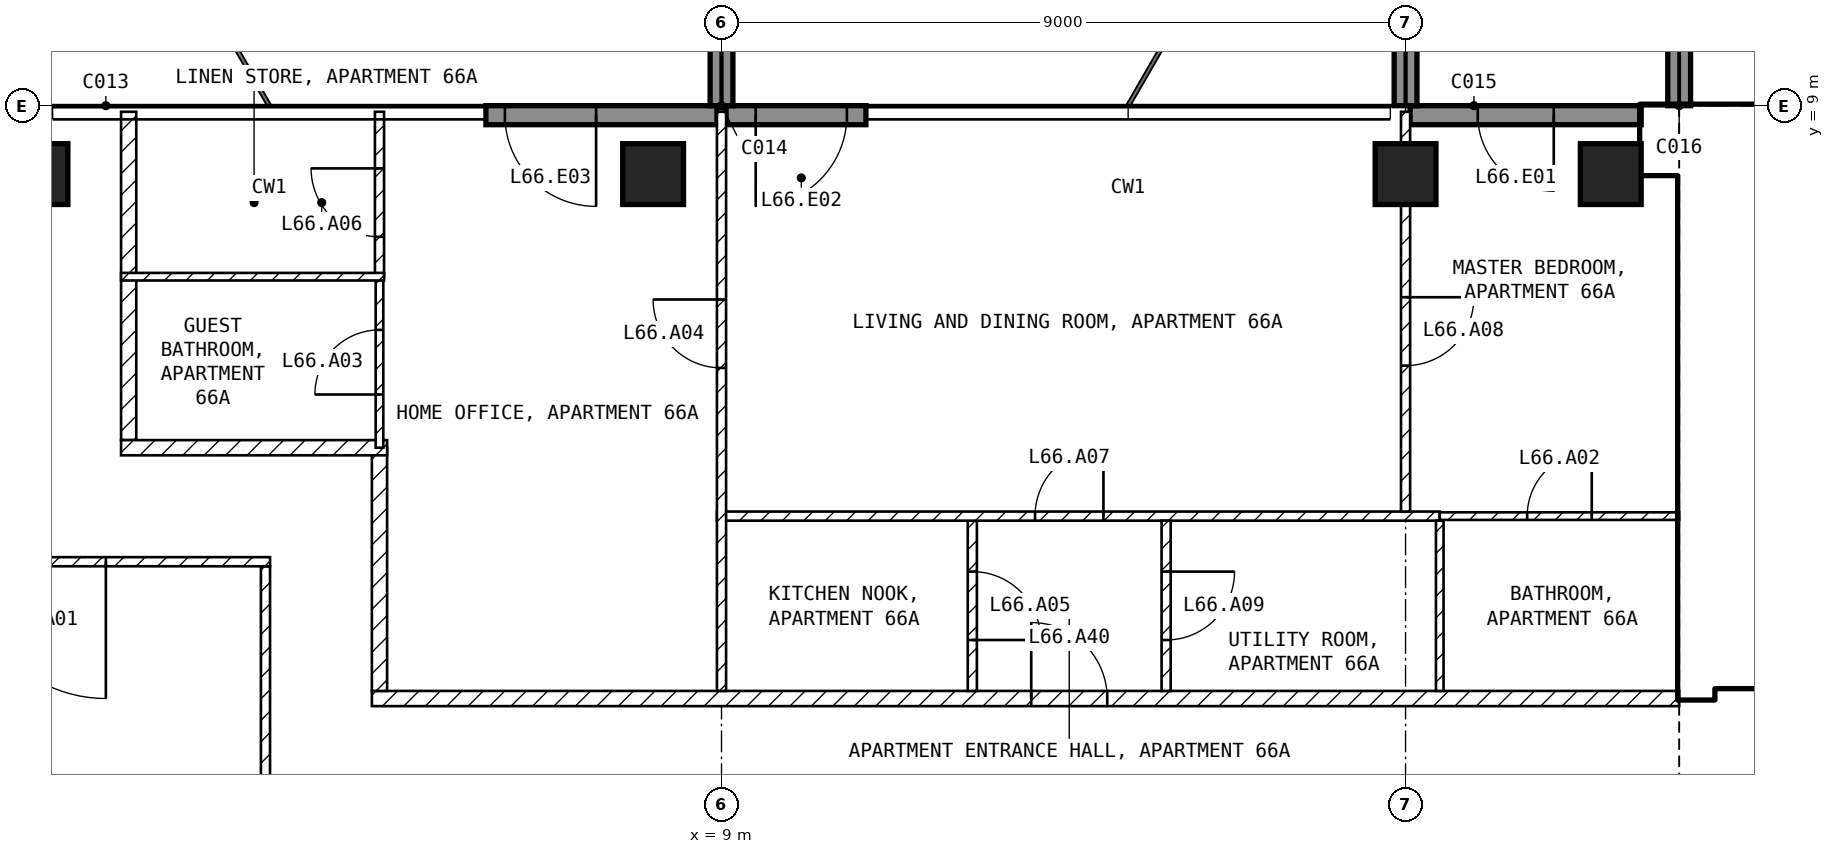
"""IFC4 building model, lengths in metres.
Left out: names, types, materials, properties, quantities, classifications, styles, units other than length and angle.
Written with IfcOpenShell. Run it as: python <this file> out.ifc"""

import sys

from ifc_helpers import new_model, si_unit, direction, frame, frame_2d, origin, origin_2d, place, context, subcontext, project, spatial, rectangle, extrude, element, fill, save


model = new_model("IFC4")
c1 = context("Model", 3, precision=1e-05, world=origin(), true_north=direction((0.0, 1.0)))
c2 = subcontext(c1, "Body", "Model", "MODEL_VIEW")
j1 = project(units=[si_unit("LENGTHUNIT", "METRE"), si_unit("PLANEANGLEUNIT", "RADIAN")], contexts=[c1])
p1 = place(None, origin())
s1 = spatial("IfcSite", under=j1, at=p1, CompositionType="ELEMENT")
p2 = place(p1, origin())
s2 = spatial("IfcBuilding", under=s1, at=p2, CompositionType="ELEMENT")
p3 = place(p2, frame((0.0, 0.0, 260.5)))
s3 = spatial("IfcBuildingStorey", under=s2, at=p3, CompositionType="ELEMENT", Elevation=260.5)
for number, where, z_axis, x_axis in (
    (1, (0.0, 8.1, -0.25), (0.0, 0.0, 1.0), (1.0, 0.0, 0.0)),
    (2, (8.1, 8.1, -0.25), (0.0, 0.0, 1.0), (1.0, 0.0, 0.0)),
    (3, (18.0, 8.1, -0.25), (0.0, 0.0, 1.0), (1.0, 0.0, 0.0)),
    (4, (20.7, 8.1, -0.25), (0.0, 0.0, 1.0), (1.0, 0.0, 0.0)),
):
    element("IfcColumn", number, at=place(p3, frame(where, z_axis=z_axis, x_axis=x_axis)), inside=s3, PredefinedType="COLUMN", context=c2, shape_type="SweptSolid", body=[
        extrude(rectangle(XDim=0.8, YDim=0.8, at=origin_2d()), origin(), (0.0, 0.0, 1.0), 3.5),
    ])
p4 = place(p3, frame((21.1, 8.875, 0.0), z_axis=(0.0, 0.0, 1.0), x_axis=(-1.0, 0.0, 0.0)))
e5 = element("IfcWall", 5, at=p4, inside=s3, PredefinedType="SOLIDWALL", context=c2, shape_type="SweptSolid", body=[
    extrude(rectangle(XDim=3.04, YDim=0.25, at=frame_2d((1.52, 0.0))), origin(), (0.0, 0.0, 1.0), 3.25),
])
p5 = place(p4, frame((1.15, 0.0, 0.0)))
e6 = element("IfcOpeningElement", 6, at=p5, cuts=e5, PredefinedType="OPENING", context=c2, shape_type="SweptSolid", body=[
    extrude(rectangle(XDim=1.0, YDim=2.4, at=frame_2d((0.5, 1.2))), frame((0.0, 0.135, 0.0), z_axis=(0.0, -1.0, 0.0), x_axis=(1.0, 0.0, 0.0)), (0.0, 0.0, 1.0), 0.27),
])
p6 = place(p3, frame((10.9, 8.875, 0.0), z_axis=(0.0, 0.0, 1.0), x_axis=(-1.0, 0.0, 0.0)))
e7 = element("IfcWall", 7, at=p6, inside=s3, PredefinedType="SOLIDWALL", context=c2, shape_type="SweptSolid", body=[
    extrude(rectangle(XDim=1.84, YDim=0.25, at=frame_2d((0.92, 0.0))), origin(), (0.0, 0.0, 1.0), 3.25),
])
p7 = place(p6, frame((0.25, 0.0, 0.0)))
e8 = element("IfcOpeningElement", 8, at=p7, cuts=e7, PredefinedType="OPENING", context=c2, shape_type="SweptSolid", body=[
    extrude(rectangle(XDim=1.2, YDim=2.4, at=frame_2d((0.6, 1.2))), frame((0.0, 0.135, 0.0), z_axis=(0.0, -1.0, 0.0), x_axis=(1.0, 0.0, 0.0)), (0.0, 0.0, 1.0), 0.27),
])
p8 = place(p3, frame((8.94, 8.875, 0.0), z_axis=(0.0, 0.0, 1.0), x_axis=(-1.0, 0.0, 0.0)))
e9 = element("IfcWall", 9, at=p8, inside=s3, PredefinedType="SOLIDWALL", context=c2, shape_type="SweptSolid", body=[
    extrude(rectangle(XDim=3.04, YDim=0.25, at=frame_2d((1.52, 0.0))), origin(), (0.0, 0.0, 1.0), 3.25),
])
p9 = place(p8, frame((1.59, 0.0, 0.0)))
e10 = element("IfcOpeningElement", 10, at=p9, cuts=e9, PredefinedType="OPENING", context=c2, shape_type="SweptSolid", body=[
    extrude(rectangle(XDim=1.2, YDim=2.4, at=frame_2d((0.6, 1.2))), frame((0.0, 0.135, 0.0), z_axis=(0.0, -1.0, 0.0), x_axis=(1.0, 0.0, 0.0)), (0.0, 0.0, 1.0), 0.27),
])
for number, where, z_axis, x_axis in (
    (11, (9.0, 9.0, 0.0), (0.0, 0.0, 1.0), (0.0, 1.0, 0.0)),
    (12, (18.0, 9.0, 0.0), (0.0, 0.0, 1.0), (0.0, 1.0, 0.0)),
    (13, (21.6, 9.0, 0.0), (0.0, 0.0, 1.0), (0.0, 1.0, 0.0)),
):
    element("IfcWall", number, at=place(p3, frame(where, z_axis=z_axis, x_axis=x_axis)), inside=s3, PredefinedType="SOLIDWALL", context=c2, shape_type="SweptSolid", body=[
        extrude(rectangle(XDim=2.7, YDim=0.3, at=frame_2d((1.35, 0.0))), origin(), (0.0, 0.0, 1.0), 3.25),
    ])
p10 = place(p3, frame((21.1, 8.55, 0.0), z_axis=(0.0, 0.0, 1.0), x_axis=(1.0, 0.0, 0.0)))
e14 = element("IfcWall", 14, at=p10, inside=s3, PredefinedType="SHEAR", context=c2, shape_type="SweptSolid", body=[
    extrude(rectangle(XDim=8.65, YDim=0.9, at=frame_2d((4.325, 0.0))), origin(), (0.0, 0.0, 1.0), 3.25),
])
p11 = place(p3, frame((21.825, 1.2, 0.0), z_axis=(0.0, 0.0, 1.0), x_axis=(0.0, 1.0, 0.0)))
e15 = element("IfcWall", 15, at=p11, inside=s3, PredefinedType="SHEAR", context=c2, shape_type="SweptSolid", body=[
    extrude(rectangle(XDim=6.9, YDim=0.45, at=frame_2d((3.45, 0.0))), origin(), (0.0, 0.0, 1.0), 3.25),
])
p12 = place(p3, frame((22.05, 1.45, 0.0), z_axis=(0.0, 0.0, 1.0), x_axis=(1.0, 0.0, 0.0)))
e16 = element("IfcWall", 16, at=p12, inside=s3, PredefinedType="SOLIDWALL", context=c2, shape_type="SweptSolid", body=[
    extrude(rectangle(XDim=11.3, YDim=0.2, at=frame_2d((5.65, 0.0))), origin(), (0.0, 0.0, 1.0), 3.25),
])
p13 = place(p12, frame((0.75, 0.0, 0.0)))
e17 = element("IfcOpeningElement", 17, at=p13, cuts=e16, PredefinedType="OPENING", context=c2, shape_type="SweptSolid", body=[
    extrude(rectangle(XDim=1.0, YDim=2.1, at=frame_2d((0.5, 1.05))), frame((0.0, 0.11, 0.0), z_axis=(0.0, -1.0, 0.0), x_axis=(1.0, 0.0, 0.0)), (0.0, 0.0, 1.0), 0.22),
])
p14 = place(p12, frame((3.25, 0.0, 0.0)))
e18 = element("IfcOpeningElement", 18, at=p14, cuts=e16, PredefinedType="OPENING", context=c2, shape_type="SweptSolid", body=[
    extrude(rectangle(XDim=1.0, YDim=2.1, at=frame_2d((0.5, 1.05))), frame((0.0, 0.11, 0.0), z_axis=(0.0, -1.0, 0.0), x_axis=(1.0, 0.0, 0.0)), (0.0, 0.0, 1.0), 0.22),
])
p15 = place(p12, frame((9.225, 0.0, 0.0)))
e19 = element("IfcOpeningElement", 19, at=p15, cuts=e16, PredefinedType="OPENING", context=c2, shape_type="SweptSolid", body=[
    extrude(rectangle(XDim=0.9, YDim=2.1, at=frame_2d((0.45, 1.05))), frame((0.0, 0.11, 0.0), z_axis=(0.0, -1.0, 0.0), x_axis=(1.0, 0.0, 0.0)), (0.0, 0.0, 1.0), 0.22),
])
p16 = place(p3, frame((22.05, 5.15, 0.0), z_axis=(0.0, 0.0, 1.0), x_axis=(1.0, 0.0, 0.0)))
e20 = element("IfcWall", 20, at=p16, inside=s3, PredefinedType="SOLIDWALL", context=c2, shape_type="SweptSolid", body=[
    extrude(rectangle(XDim=6.3, YDim=0.2, at=frame_2d((3.15, 0.0))), origin(), (0.0, 0.0, 1.0), 3.25),
])
p17 = place(p16, frame((0.2, 0.0, 0.0)))
e21 = element("IfcOpeningElement", 21, at=p17, cuts=e20, PredefinedType="OPENING", context=c2, shape_type="SweptSolid", body=[
    extrude(rectangle(XDim=1.0, YDim=2.1, at=frame_2d((0.5, 1.05))), frame((0.0, 0.11, 0.0), z_axis=(0.0, -1.0, 0.0), x_axis=(1.0, 0.0, 0.0)), (0.0, 0.0, 1.0), 0.22),
])
p18 = place(p3, frame((3.0, -2.94, 0.0), z_axis=(0.0, 0.0, 1.0), x_axis=(0.0, 1.0, 0.0)))
e22 = element("IfcWall", 22, at=p18, inside=s3, PredefinedType="PARTITIONING", context=c2, shape_type="SweptSolid", body=[
    extrude(rectangle(XDim=5.88, YDim=0.12, at=frame_2d((2.94, 0.0))), origin(), (0.0, 0.0, 1.0), 3.25),
])
p19 = place(p3, frame((3.06, 3.0, 0.0), z_axis=(0.0, 0.0, 1.0), x_axis=(-1.0, 0.0, 0.0)))
e23 = element("IfcWall", 23, at=p19, inside=s3, PredefinedType="PARTITIONING", context=c2, shape_type="SweptSolid", body=[
    extrude(rectangle(XDim=6.12, YDim=0.12, at=frame_2d((3.06, 0.0))), origin(), (0.0, 0.0, 1.0), 3.25),
])
p20 = place(p19, frame((2.16, 0.0, 0.0)))
e24 = element("IfcOpeningElement", 24, at=p20, cuts=e23, PredefinedType="OPENING", context=c2, shape_type="SweptSolid", body=[
    extrude(rectangle(XDim=1.8, YDim=2.1, at=frame_2d((0.9, 1.05))), frame((0.0, 0.07, 0.0), z_axis=(0.0, -1.0, 0.0), x_axis=(1.0, 0.0, 0.0)), (0.0, 0.0, 1.0), 0.14),
])
p21 = place(p3, frame((4.4, 1.2, 0.0), z_axis=(0.0, 0.0, 1.0), x_axis=(1.0, 0.0, 0.0)))
e25 = element("IfcWall", 25, at=p21, inside=s3, PredefinedType="PARTITIONING", context=c2, shape_type="SweptSolid", body=[
    extrude(rectangle(XDim=17.2, YDim=0.2, at=frame_2d((8.6, 0.0))), origin(), (0.0, 0.0, 1.0), 3.25),
])
p22 = place(p21, frame((8.675, 0.0, 0.0)))
e26 = element("IfcOpeningElement", 26, at=p22, cuts=e25, PredefinedType="OPENING", context=c2, shape_type="SweptSolid", body=[
    extrude(rectangle(XDim=1.0, YDim=2.1, at=frame_2d((0.5, 1.05))), frame((0.0, 0.11, 0.0), z_axis=(0.0, -1.0, 0.0), x_axis=(1.0, 0.0, 0.0)), (0.0, 0.0, 1.0), 0.22),
])
p23 = place(p3, frame((4.5, 4.5, 0.0), z_axis=(0.0, 0.0, 1.0), x_axis=(0.0, -1.0, 0.0)))
e27 = element("IfcWall", 27, at=p23, inside=s3, PredefinedType="PARTITIONING", context=c2, shape_type="SweptSolid", body=[
    extrude(rectangle(XDim=3.2, YDim=0.2, at=frame_2d((1.6, 0.0))), origin(), (0.0, 0.0, 1.0), 3.25),
])
p24 = place(p3, frame((1.2, 8.92, 0.0), z_axis=(0.0, 0.0, 1.0), x_axis=(0.0, -1.0, 0.0)))
e28 = element("IfcWall", 28, at=p24, inside=s3, PredefinedType="PARTITIONING", context=c2, shape_type="SweptSolid", body=[
    extrude(rectangle(XDim=4.32, YDim=0.2, at=frame_2d((2.16, 0.0))), origin(), (0.0, 0.0, 1.0), 3.25),
])
p25 = place(p3, frame((1.1, 4.5, 0.0), z_axis=(0.0, 0.0, 1.0), x_axis=(1.0, 0.0, 0.0)))
e29 = element("IfcWall", 29, at=p25, inside=s3, PredefinedType="PARTITIONING", context=c2, shape_type="SweptSolid", body=[
    extrude(rectangle(XDim=3.5, YDim=0.2, at=frame_2d((1.75, 0.0))), origin(), (0.0, 0.0, 1.0), 3.25),
])
p26 = place(p3, frame((12.3, 3.54, 0.0), z_axis=(0.0, 0.0, 1.0), x_axis=(0.0, -1.0, 0.0)))
e30 = element("IfcWall", 30, at=p26, inside=s3, PredefinedType="PARTITIONING", context=c2, shape_type="SweptSolid", body=[
    extrude(rectangle(XDim=2.24, YDim=0.12, at=frame_2d((1.12, 0.0))), origin(), (0.0, 0.0, 1.0), 3.25),
])
p27 = place(p26, frame((0.67, 0.0, 0.0)))
e31 = element("IfcOpeningElement", 31, at=p27, cuts=e30, PredefinedType="OPENING", context=c2, shape_type="SweptSolid", body=[
    extrude(rectangle(XDim=0.9, YDim=2.1, at=frame_2d((0.45, 1.05))), frame((0.0, 0.07, 0.0), z_axis=(0.0, -1.0, 0.0), x_axis=(1.0, 0.0, 0.0)), (0.0, 0.0, 1.0), 0.14),
])
p28 = place(p3, frame((8.94, 3.6, 0.0), z_axis=(0.0, 0.0, 1.0), x_axis=(1.0, 0.0, 0.0)))
e32 = element("IfcWall", 32, at=p28, inside=s3, PredefinedType="PARTITIONING", context=c2, shape_type="SweptSolid", body=[
    extrude(rectangle(XDim=9.51, YDim=0.12, at=frame_2d((4.755, 0.0))), origin(), (0.0, 0.0, 1.0), 3.25),
])
p29 = place(p28, frame((4.185, 0.0, 0.0)))
e33 = element("IfcOpeningElement", 33, at=p29, cuts=e32, PredefinedType="OPENING", context=c2, shape_type="SweptSolid", body=[
    extrude(rectangle(XDim=0.9, YDim=2.1, at=frame_2d((0.45, 1.05))), frame((0.0, 0.07, 0.0), z_axis=(0.0, -1.0, 0.0), x_axis=(1.0, 0.0, 0.0)), (0.0, 0.0, 1.0), 0.14),
])
p30 = place(p3, frame((9.0, 1.3, 0.0), z_axis=(0.0, 0.0, 1.0), x_axis=(0.0, 1.0, 0.0)))
e34 = element("IfcWall", 34, at=p30, inside=s3, PredefinedType="PARTITIONING", context=c2, shape_type="SweptSolid", body=[
    extrude(rectangle(XDim=7.62, YDim=0.12, at=frame_2d((3.81, 0.0))), origin(), (0.0, 0.0, 1.0), 3.25),
])
p31 = place(p30, frame((4.25, 0.0, 0.0)))
e35 = element("IfcOpeningElement", 35, at=p31, cuts=e34, PredefinedType="OPENING", context=c2, shape_type="SweptSolid", body=[
    extrude(rectangle(XDim=0.9, YDim=2.1, at=frame_2d((0.45, 1.05))), frame((0.0, 0.07, 0.0), z_axis=(0.0, -1.0, 0.0), x_axis=(1.0, 0.0, 0.0)), (0.0, 0.0, 1.0), 0.14),
])
p32 = place(p3, frame((14.85, 3.54, 0.0), z_axis=(0.0, 0.0, 1.0), x_axis=(0.0, -1.0, 0.0)))
e36 = element("IfcWall", 36, at=p32, inside=s3, PredefinedType="PARTITIONING", context=c2, shape_type="SweptSolid", body=[
    extrude(rectangle(XDim=2.24, YDim=0.12, at=frame_2d((1.12, 0.0))), origin(), (0.0, 0.0, 1.0), 3.25),
])
p33 = place(p32, frame((0.67, 0.0, 0.0)))
e37 = element("IfcOpeningElement", 37, at=p33, cuts=e36, PredefinedType="OPENING", context=c2, shape_type="SweptSolid", body=[
    extrude(rectangle(XDim=0.9, YDim=2.1, at=frame_2d((0.45, 1.05))), frame((0.0, 0.07, 0.0), z_axis=(0.0, -1.0, 0.0), x_axis=(1.0, 0.0, 0.0)), (0.0, 0.0, 1.0), 0.14),
])
p34 = place(p3, frame((18.45, 3.54, 0.0), z_axis=(0.0, 0.0, 1.0), x_axis=(0.0, -1.0, 0.0)))
e38 = element("IfcWall", 38, at=p34, inside=s3, PredefinedType="PARTITIONING", context=c2, shape_type="SweptSolid", body=[
    extrude(rectangle(XDim=2.24, YDim=0.1, at=frame_2d((1.12, 0.0))), origin(), (0.0, 0.0, 1.0), 3.25),
])
p35 = place(p3, frame((18.45, 3.6, 0.0), z_axis=(0.0, 0.0, 1.0), x_axis=(1.0, 0.0, 0.0)))
e39 = element("IfcWall", 39, at=p35, inside=s3, PredefinedType="PARTITIONING", context=c2, shape_type="SweptSolid", body=[
    extrude(rectangle(XDim=3.15, YDim=0.1, at=frame_2d((1.575, 0.0))), origin(), (0.0, 0.0, 1.0), 3.25),
])
p36 = place(p35, frame((1.15, 0.0, 0.0)))
e40 = element("IfcOpeningElement", 40, at=p36, cuts=e39, PredefinedType="OPENING", context=c2, shape_type="SweptSolid", body=[
    extrude(rectangle(XDim=0.85, YDim=2.1, at=frame_2d((0.425, 1.05))), frame((0.0, 0.06, 0.0), z_axis=(0.0, -1.0, 0.0), x_axis=(1.0, 0.0, 0.0)), (0.0, 0.0, 1.0), 0.12),
])
p37 = place(p3, frame((18.0, 8.92, 0.0), z_axis=(0.0, 0.0, 1.0), x_axis=(0.0, -1.0, 0.0)))
e41 = element("IfcWall", 41, at=p37, inside=s3, PredefinedType="PARTITIONING", context=c2, shape_type="SweptSolid", body=[
    extrude(rectangle(XDim=5.26, YDim=0.12, at=frame_2d((2.63, 0.0))), origin(), (0.0, 0.0, 1.0), 2.496),
])
p38 = place(p37, frame((2.44, 0.0, 0.0)))
e42 = element("IfcOpeningElement", 42, at=p38, cuts=e41, PredefinedType="OPENING", context=c2, shape_type="SweptSolid", body=[
    extrude(rectangle(XDim=0.9, YDim=2.1, at=frame_2d((0.45, 1.05))), frame((0.0, 0.07, 0.0), z_axis=(0.0, -1.0, 0.0), x_axis=(1.0, 0.0, 0.0)), (0.0, 0.0, 1.0), 0.14),
])
p39 = place(p3, frame((4.5, 4.5, 0.0), z_axis=(0.0, 0.0, 1.0), x_axis=(0.0, 1.0, 0.0)))
e43 = element("IfcWall", 43, at=p39, inside=s3, PredefinedType="PARTITIONING", context=c2, shape_type="SweptSolid", body=[
    extrude(rectangle(XDim=2.25, YDim=0.1, at=frame_2d((1.125, 0.0))), origin(), (0.0, 0.0, 1.0), 3.25),
])
p40 = place(p39, frame((0.7, 0.0, 0.0)))
e44 = element("IfcOpeningElement", 44, at=p40, cuts=e43, PredefinedType="OPENING", context=c2, shape_type="SweptSolid", body=[
    extrude(rectangle(XDim=0.85, YDim=2.1, at=frame_2d((0.425, 1.05))), frame((0.0, 0.06, 0.0), z_axis=(0.0, -1.0, 0.0), x_axis=(1.0, 0.0, 0.0)), (0.0, 0.0, 1.0), 0.12),
])
p41 = place(p3, frame((4.5, 6.75, 0.0), z_axis=(0.0, 0.0, 1.0), x_axis=(0.0, 1.0, 0.0)))
e45 = element("IfcWall", 45, at=p41, inside=s3, PredefinedType="PARTITIONING", context=c2, shape_type="SweptSolid", body=[
    extrude(rectangle(XDim=2.17, YDim=0.12, at=frame_2d((1.085, 0.0))), origin(), (0.0, 0.0, 1.0), 3.25),
])
p42 = place(p41, frame((0.525, 0.0, 0.0)))
e46 = element("IfcOpeningElement", 46, at=p42, cuts=e45, PredefinedType="OPENING", context=c2, shape_type="SweptSolid", body=[
    extrude(rectangle(XDim=0.9, YDim=2.1, at=frame_2d((0.45, 1.05))), frame((0.0, 0.07, 0.0), z_axis=(0.0, -1.0, 0.0), x_axis=(1.0, 0.0, 0.0)), (0.0, 0.0, 1.0), 0.14),
])
p43 = place(p3, frame((1.1, 6.75, 0.0), z_axis=(0.0, 0.0, 1.0), x_axis=(1.0, 0.0, 0.0)))
e47 = element("IfcWall", 47, at=p43, inside=s3, PredefinedType="PARTITIONING", context=c2, shape_type="SweptSolid", body=[
    extrude(rectangle(XDim=3.46, YDim=0.1, at=frame_2d((1.73, 0.0))), origin(), (0.0, 0.0, 1.0), 3.25),
])
p44 = place(p5, origin())
e48 = element("IfcDoor", 48, at=p44, inside=s3, OperationType="SINGLE_SWING_LEFT", PredefinedType="DOOR", context=c2, shape_type="SweptSolid", body=[
    extrude(rectangle(XDim=1.0, YDim=2.4, at=frame_2d((0.5, 1.2))), frame((0.0, 0.025, 0.0), z_axis=(0.0, -1.0, 0.0), x_axis=(1.0, 0.0, 0.0)), (0.0, 0.0, 1.0), 0.05),
])
fill(e6, e48)
p45 = place(p7, origin())
e49 = element("IfcDoor", 49, at=p45, inside=s3, OperationType="SINGLE_SWING_RIGHT", PredefinedType="DOOR", context=c2, shape_type="SweptSolid", body=[
    extrude(rectangle(XDim=1.2, YDim=2.4, at=frame_2d((0.6, 1.2))), frame((0.0, 0.025, 0.0), z_axis=(0.0, -1.0, 0.0), x_axis=(1.0, 0.0, 0.0)), (0.0, 0.0, 1.0), 0.05),
])
fill(e8, e49)
p46 = place(p9, origin())
e50 = element("IfcDoor", 50, at=p46, inside=s3, OperationType="SINGLE_SWING_LEFT", PredefinedType="DOOR", context=c2, shape_type="SweptSolid", body=[
    extrude(rectangle(XDim=1.2, YDim=2.4, at=frame_2d((0.6, 1.2))), frame((0.0, 0.025, 0.0), z_axis=(0.0, -1.0, 0.0), x_axis=(1.0, 0.0, 0.0)), (0.0, 0.0, 1.0), 0.05),
])
fill(e10, e50)
p47 = place(p17, origin())
e51 = element("IfcDoor", 51, at=p47, inside=s3, OperationType="SINGLE_SWING_LEFT", PredefinedType="DOOR", context=c2, shape_type="SweptSolid", body=[
    extrude(rectangle(XDim=1.0, YDim=2.1, at=frame_2d((0.5, 1.05))), frame((0.0, 0.025, 0.0), z_axis=(0.0, -1.0, 0.0), x_axis=(1.0, 0.0, 0.0)), (0.0, 0.0, 1.0), 0.05),
])
fill(e21, e51)
p48 = place(p20, origin())
e52 = element("IfcDoor", 52, at=p48, inside=s3, OperationType="SINGLE_SWING_LEFT", PredefinedType="DOOR", context=c2, shape_type="SweptSolid", body=[
    extrude(rectangle(XDim=1.8, YDim=2.1, at=frame_2d((0.9, 1.05))), frame((0.0, 0.025, 0.0), z_axis=(0.0, -1.0, 0.0), x_axis=(1.0, 0.0, 0.0)), (0.0, 0.0, 1.0), 0.05),
])
fill(e24, e52)
p49 = place(p36, origin())
e53 = element("IfcDoor", 53, at=p49, inside=s3, OperationType="SINGLE_SWING_RIGHT", PredefinedType="DOOR", context=c2, shape_type="SweptSolid", body=[
    extrude(rectangle(XDim=0.85, YDim=2.1, at=frame_2d((0.425, 1.05))), frame((0.0, 0.025, 0.0), z_axis=(0.0, -1.0, 0.0), x_axis=(1.0, 0.0, 0.0)), (0.0, 0.0, 1.0), 0.05),
])
fill(e40, e53)
p50 = place(p40, origin())
e54 = element("IfcDoor", 54, at=p50, inside=s3, OperationType="SINGLE_SWING_LEFT", PredefinedType="DOOR", context=c2, shape_type="SweptSolid", body=[
    extrude(rectangle(XDim=0.85, YDim=2.1, at=frame_2d((0.425, 1.05))), frame((0.0, 0.025, 0.0), z_axis=(0.0, -1.0, 0.0), x_axis=(1.0, 0.0, 0.0)), (0.0, 0.0, 1.0), 0.05),
])
fill(e44, e54)
p51 = place(p31, origin())
e55 = element("IfcDoor", 55, at=p51, inside=s3, OperationType="SINGLE_SWING_RIGHT", PredefinedType="DOOR", context=c2, shape_type="SweptSolid", body=[
    extrude(rectangle(XDim=0.9, YDim=2.1, at=frame_2d((0.45, 1.05))), frame((0.0, 0.025, 0.0), z_axis=(0.0, -1.0, 0.0), x_axis=(1.0, 0.0, 0.0)), (0.0, 0.0, 1.0), 0.05),
])
fill(e35, e55)
p52 = place(p27, origin())
e56 = element("IfcDoor", 56, at=p52, inside=s3, OperationType="SINGLE_SWING_RIGHT", PredefinedType="DOOR", context=c2, shape_type="SweptSolid", body=[
    extrude(rectangle(XDim=0.9, YDim=2.1, at=frame_2d((0.45, 1.05))), frame((0.0, 0.025, 0.0), z_axis=(0.0, -1.0, 0.0), x_axis=(1.0, 0.0, 0.0)), (0.0, 0.0, 1.0), 0.05),
])
fill(e31, e56)
p53 = place(p42, origin())
e57 = element("IfcDoor", 57, at=p53, inside=s3, OperationType="SINGLE_SWING_RIGHT", PredefinedType="DOOR", context=c2, shape_type="SweptSolid", body=[
    extrude(rectangle(XDim=0.9, YDim=2.1, at=frame_2d((0.45, 1.05))), frame((0.0, 0.025, 0.0), z_axis=(0.0, -1.0, 0.0), x_axis=(1.0, 0.0, 0.0)), (0.0, 0.0, 1.0), 0.05),
])
fill(e46, e57)
p54 = place(p29, origin())
e58 = element("IfcDoor", 58, at=p54, inside=s3, OperationType="SINGLE_SWING_RIGHT", PredefinedType="DOOR", context=c2, shape_type="SweptSolid", body=[
    extrude(rectangle(XDim=0.9, YDim=2.1, at=frame_2d((0.45, 1.05))), frame((0.0, 0.025, 0.0), z_axis=(0.0, -1.0, 0.0), x_axis=(1.0, 0.0, 0.0)), (0.0, 0.0, 1.0), 0.05),
])
fill(e33, e58)
p55 = place(p38, origin())
e59 = element("IfcDoor", 59, at=p55, inside=s3, OperationType="SINGLE_SWING_LEFT", PredefinedType="DOOR", context=c2, shape_type="SweptSolid", body=[
    extrude(rectangle(XDim=0.9, YDim=2.1, at=frame_2d((0.45, 1.05))), frame((0.0, 0.025, 0.0), z_axis=(0.0, -1.0, 0.0), x_axis=(1.0, 0.0, 0.0)), (0.0, 0.0, 1.0), 0.05),
])
fill(e42, e59)
p56 = place(p33, origin())
e60 = element("IfcDoor", 60, at=p56, inside=s3, OperationType="SINGLE_SWING_LEFT", PredefinedType="DOOR", context=c2, shape_type="SweptSolid", body=[
    extrude(rectangle(XDim=0.9, YDim=2.1, at=frame_2d((0.45, 1.05))), frame((0.0, 0.025, 0.0), z_axis=(0.0, -1.0, 0.0), x_axis=(1.0, 0.0, 0.0)), (0.0, 0.0, 1.0), 0.05),
])
fill(e37, e60)
p57 = place(p22, origin())
e61 = element("IfcDoor", 61, at=p57, inside=s3, OperationType="SINGLE_SWING_LEFT", PredefinedType="DOOR", context=c2, shape_type="SweptSolid", body=[
    extrude(rectangle(XDim=1.0, YDim=2.1, at=frame_2d((0.5, 1.05))), frame((0.0, 0.025, 0.0), z_axis=(0.0, -1.0, 0.0), x_axis=(1.0, 0.0, 0.0)), (0.0, 0.0, 1.0), 0.05),
])
fill(e26, e61)
save(model, sys.argv[1])
